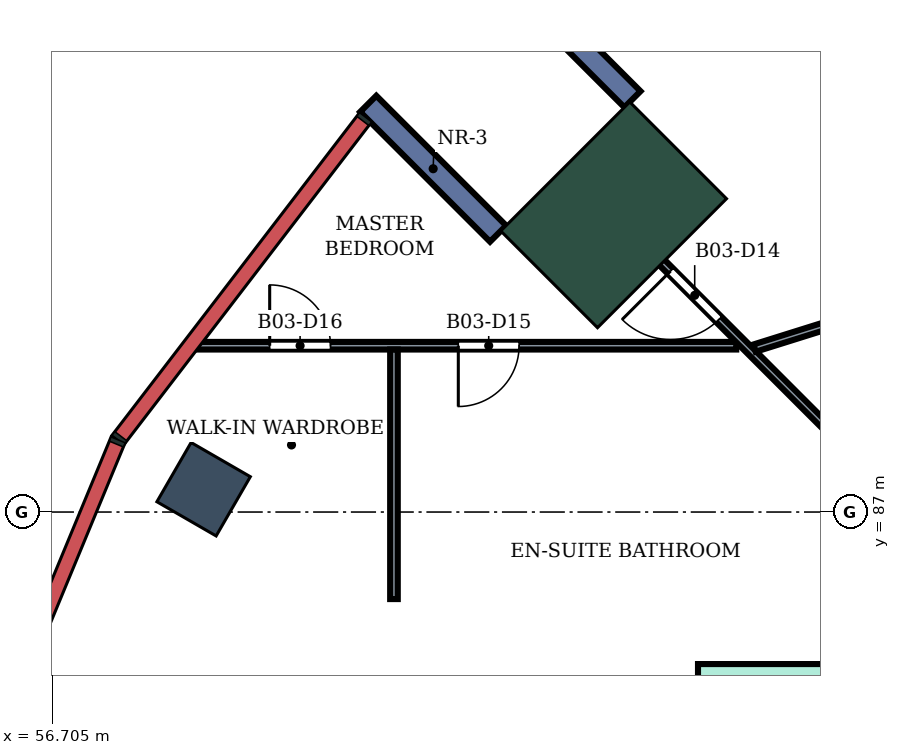
"""IFC4 building model, lengths in metres.
Left out: names, types, materials, properties, quantities, classifications, styles, units other than length and angle.
Written with IfcOpenShell. Run it as: python <this file> out.ifc"""

import sys

from ifc_helpers import new_model, si_unit, direction, frame, frame_2d, origin, origin_2d, place, context, subcontext, project, spatial, rectangle, extrude, element, fill, save


model = new_model("IFC4")
c1 = context("Model", 3, precision=1e-05, world=origin(), true_north=direction((0.0, 1.0)))
c2 = subcontext(c1, "Body", "Model", "MODEL_VIEW")
j1 = project(units=[si_unit("LENGTHUNIT", "METRE"), si_unit("PLANEANGLEUNIT", "RADIAN")], contexts=[c1])
p1 = place(None, origin())
s1 = spatial("IfcSite", under=j1, at=p1, CompositionType="ELEMENT")
p2 = place(p1, origin())
s2 = spatial("IfcBuilding", under=s1, at=p2, CompositionType="ELEMENT")
p3 = place(p2, frame((0.0, 0.0, 237.3)))
s3 = spatial("IfcBuildingStorey", under=s2, at=p3, CompositionType="ELEMENT", Elevation=237.3)
p4 = place(p3, frame((58.696, 87.3, 0.0), z_axis=(0.0, 0.0, 1.0), x_axis=(-0.866025403784, 0.5, 0.0)))
e1 = element("IfcColumn", 1, at=p4, inside=s3, PredefinedType="COLUMN", context=c2, shape_type="SweptSolid", body=[
    extrude(rectangle(XDim=0.9, YDim=0.9, at=origin_2d()), origin(), (0.0, 0.0, 1.0), 4.2),
])
p5 = place(p3, frame((64.09, 90.91, 0.0), z_axis=(0.0, 0.0, 1.0), x_axis=(-0.707106781187, 0.707106781187, 0.0)))
e2 = element("IfcColumn", 2, at=p5, inside=s3, PredefinedType="COLUMN", context=c2, shape_type="SweptSolid", body=[
    extrude(rectangle(XDim=1.8, YDim=2.4, at=origin_2d()), origin(), (0.0, 0.0, 1.0), 4.2),
])
for number, where, z_axis, x_axis in (
    (3, (64.338, 92.43, 0.0), (0.0, 0.0, 1.0), (-0.707, 0.707, 0.0)),
    (4, (62.57, 90.662, 0.0), (0.0, 0.0, 1.0), (-0.707, 0.707, 0.0)),
):
    element("IfcWall", number, at=place(p3, frame(where, z_axis=z_axis, x_axis=x_axis)), inside=s3, PredefinedType="NOTDEFINED", context=c2, shape_type="SweptSolid", body=[
        extrude(rectangle(XDim=2.416, YDim=0.3, at=frame_2d((1.208, 0.0))), origin(), (0.0, 0.0, 1.0), 4.2),
    ])
p6 = place(p3, frame((65.2, 84.9, 0.0), z_axis=(0.0, 0.0, 1.0), x_axis=(1.0, 0.0, 0.0)))
e5 = element("IfcWall", 5, at=p6, inside=s3, PredefinedType="PARTITIONING", context=c2, shape_type="SweptSolid", body=[
    extrude(rectangle(XDim=2.8, YDim=0.2, at=frame_2d((1.4, 0.0))), origin(), (0.0, 0.0, 1.0), 3.75),
])
p7 = place(p3, frame((58.6, 89.188, 0.0), z_axis=(0.0, 0.0, 1.0), x_axis=(1.0, 0.0, 0.0)))
e6 = element("IfcWall", 6, at=p7, inside=s3, PredefinedType="PARTITIONING", context=c2, shape_type="SweptSolid", body=[
    extrude(rectangle(XDim=7.103, YDim=0.1, at=frame_2d((3.551, 0.0))), origin(), (0.0, 0.0, 1.0), 3.75),
])
p8 = place(p7, frame((3.447, 0.0, 0.0)))
e7 = element("IfcOpeningElement", 7, at=p8, cuts=e6, PredefinedType="OPENING", context=c2, shape_type="SweptSolid", body=[
    extrude(rectangle(XDim=0.8, YDim=2.1, at=frame_2d((0.4, 1.05))), frame((0.0, 0.06, 0.0), z_axis=(0.0, -1.0, 0.0), x_axis=(1.0, 0.0, 0.0)), (0.0, 0.0, 1.0), 0.12),
])
p9 = place(p7, frame((0.965, 0.0, 0.0)))
e8 = element("IfcOpeningElement", 8, at=p9, cuts=e6, PredefinedType="OPENING", context=c2, shape_type="SweptSolid", body=[
    extrude(rectangle(XDim=0.8, YDim=2.1, at=frame_2d((0.4, 1.05))), frame((0.0, 0.06, 0.0), z_axis=(0.0, -1.0, 0.0), x_axis=(1.0, 0.0, 0.0)), (0.0, 0.0, 1.0), 0.12),
])
p10 = place(p3, frame((61.2, 85.855, 0.0), z_axis=(0.0, 0.0, 1.0), x_axis=(0.0, 1.0, 0.0)))
e9 = element("IfcWall", 9, at=p10, inside=s3, PredefinedType="PARTITIONING", context=c2, shape_type="SweptSolid", body=[
    extrude(rectangle(XDim=3.283, YDim=0.1, at=frame_2d((1.642, 0.0))), origin(), (0.0, 0.0, 1.0), 3.75),
])
p11 = place(p3, frame((63.599, 91.409, 0.0), z_axis=(0.0, 0.0, 1.0), x_axis=(0.706948776529, -0.707264750546, 0.0)))
e10 = element("IfcWall", 10, at=p11, inside=s3, PredefinedType="PARTITIONING", context=c2, shape_type="SweptSolid", body=[
    extrude(rectangle(XDim=8.499, YDim=0.1, at=frame_2d((4.25, 0.0))), origin(), (0.0, 0.0, 1.0), 3.75),
])
p12 = place(p11, frame((1.753, 0.0, 0.0)))
e11 = element("IfcOpeningElement", 11, at=p12, cuts=e10, PredefinedType="OPENING", context=c2, shape_type="SweptSolid", body=[
    extrude(rectangle(XDim=0.9, YDim=2.1, at=frame_2d((0.45, 1.05))), frame((0.0, 0.06, 0.0), z_axis=(0.0, -1.0, 0.0), x_axis=(1.0, 0.0, 0.0)), (0.0, 0.0, 1.0), 0.12),
])
p13 = place(p3, frame((65.944, 89.157, 0.0), z_axis=(0.0, 0.0, 1.0), x_axis=(0.954248987961, 0.299013158531, 0.0)))
e12 = element("IfcWall", 12, at=p13, inside=s3, PredefinedType="PARTITIONING", context=c2, shape_type="SweptSolid", body=[
    extrude(rectangle(XDim=5.159, YDim=0.1, at=frame_2d((2.58, 0.0))), origin(), (0.0, 0.0, 1.0), 3.75),
])
p14 = place(p13, frame((1.316, 0.0, 0.0)))
e13 = element("IfcOpeningElement", 13, at=p14, cuts=e12, PredefinedType="OPENING", context=c2, shape_type="SweptSolid", body=[
    extrude(rectangle(XDim=0.8, YDim=2.1, at=frame_2d((0.4, 1.05))), frame((0.0, 0.06, 0.0), z_axis=(0.0, -1.0, 0.0), x_axis=(1.0, 0.0, 0.0)), (0.0, 0.0, 1.0), 0.12),
])
p15 = place(p12, frame((0.9, 0.0, 0.0), z_axis=(0.0, 0.0, 1.0), x_axis=(-1.0, 0.0, 0.0)))
e14 = element("IfcDoor", 14, at=p15, inside=s3, OperationType="SINGLE_SWING_RIGHT", PredefinedType="DOOR", context=c2, shape_type="SweptSolid", body=[
    extrude(rectangle(XDim=0.9, YDim=2.1, at=frame_2d((0.45, 1.05))), frame((0.0, 0.025, 0.0), z_axis=(0.0, -1.0, 0.0), x_axis=(1.0, 0.0, 0.0)), (0.0, 0.0, 1.0), 0.05),
])
fill(e11, e14)
p16 = place(p8, frame((0.8, 0.0, 0.0), z_axis=(0.0, 0.0, 1.0), x_axis=(-1.0, 0.0, 0.0)))
e15 = element("IfcDoor", 15, at=p16, inside=s3, OperationType="SINGLE_SWING_RIGHT", PredefinedType="DOOR", context=c2, shape_type="SweptSolid", body=[
    extrude(rectangle(XDim=0.8, YDim=2.1, at=frame_2d((0.4, 1.05))), frame((0.0, 0.025, 0.0), z_axis=(0.0, -1.0, 0.0), x_axis=(1.0, 0.0, 0.0)), (0.0, 0.0, 1.0), 0.05),
])
fill(e7, e15)
p17 = place(p9, origin())
e16 = element("IfcDoor", 16, at=p17, inside=s3, OperationType="SINGLE_SWING_LEFT", PredefinedType="DOOR", context=c2, shape_type="SweptSolid", body=[
    extrude(rectangle(XDim=0.8, YDim=2.1, at=frame_2d((0.4, 1.05))), frame((0.0, 0.025, 0.0), z_axis=(0.0, -1.0, 0.0), x_axis=(1.0, 0.0, 0.0)), (0.0, 0.0, 1.0), 0.05),
])
fill(e8, e16)
save(model, sys.argv[1])
